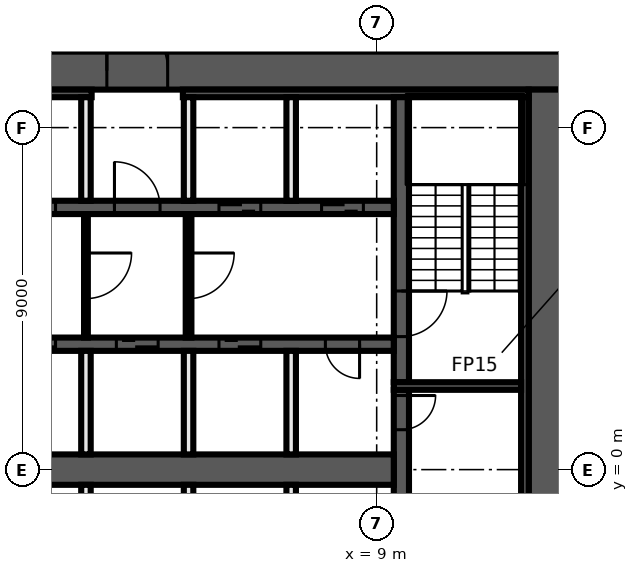
"""IFC4 building model, lengths in metres.
Left out: names, types, materials, properties, quantities, classifications, styles, units other than length and angle.
Written with IfcOpenShell. Run it as: python <this file> out.ifc"""

import sys

from ifc_helpers import new_model, si_unit, direction, frame, frame_2d, origin, place, context, subcontext, project, spatial, rectangle, extrude, element, fill, save


model = new_model("IFC4")
c1 = context("Model", 3, precision=1e-05, world=origin(), true_north=direction((0.0, 1.0)))
c2 = subcontext(c1, "Body", "Model", "MODEL_VIEW")
j1 = project(units=[si_unit("LENGTHUNIT", "METRE"), si_unit("PLANEANGLEUNIT", "RADIAN")], contexts=[c1])
p1 = place(None, origin())
s1 = spatial("IfcSite", under=j1, at=p1, CompositionType="ELEMENT")
p2 = place(p1, origin())
s2 = spatial("IfcBuilding", under=s1, at=p2, CompositionType="ELEMENT")
p3 = place(p2, frame((0.0, 0.0, 95.2)))
s3 = spatial("IfcBuildingStorey", under=s2, at=p3, CompositionType="ELEMENT", Elevation=95.2)
for number, where, z_axis, x_axis in (
    (1, (3.6, 11.0, 0.0), (0.0, 0.0, 1.0), (0.0, 1.0, 0.0)),
    (2, (1.8, 11.0, 0.0), (0.0, 0.0, 1.0), (0.0, 1.0, 0.0)),
):
    element("IfcWall", number, at=place(p3, frame(where, z_axis=z_axis, x_axis=x_axis)), inside=s3, PredefinedType="PARTITIONING", context=c2, shape_type="SweptSolid", body=[
        extrude(rectangle(XDim=1.175, YDim=0.15, at=frame_2d((0.587, 0.0))), origin(), (0.0, 0.0, 1.0), 3.25),
    ])
p4 = place(p3, frame((-14.0, 10.5, 0.0), z_axis=(0.0, 0.0, 1.0), x_axis=(1.0, 0.0, 0.0)))
e3 = element("IfcWall", 3, at=p4, inside=s3, PredefinedType="SHEAR", context=c2, shape_type="SweptSolid", body=[
    extrude(rectangle(XDim=28.0, YDim=1.0, at=frame_2d((14.0, 0.0))), origin(), (0.0, 0.0, 1.0), 3.25),
])
p5 = place(p4, frame((15.9, 0.0, 0.0)))
e4 = element("IfcOpeningElement", 4, at=p5, cuts=e3, PredefinedType="OPENING", context=c2, shape_type="SweptSolid", body=[
    extrude(rectangle(XDim=1.6, YDim=2.1, at=frame_2d((0.8, 1.05))), frame((0.0, 0.51, 0.0), z_axis=(0.0, -1.0, 0.0), x_axis=(1.0, 0.0, 0.0)), (0.0, 0.0, 1.0), 1.02),
])
p6 = place(p3, frame((13.5, 10.0, 0.0), z_axis=(0.0, 0.0, 1.0), x_axis=(0.0, -1.0, 0.0)))
e5 = element("IfcWall", 5, at=p6, inside=s3, PredefinedType="SHEAR", context=c2, shape_type="SweptSolid", body=[
    extrude(rectangle(XDim=20.0, YDim=1.0, at=frame_2d((10.0, 0.0))), origin(), (0.0, 0.0, 1.0), 3.25),
])
p7 = place(p3, frame((-13.0, 9.9, 0.0), z_axis=(0.0, 0.0, 1.0), x_axis=(1.0, 0.0, 0.0)))
e6 = element("IfcWall", 6, at=p7, inside=s3, PredefinedType="SHEAR", context=c2, shape_type="SweptSolid", body=[
    extrude(rectangle(XDim=14.5, YDim=0.2, at=frame_2d((7.25, 0.0))), origin(), (0.0, 0.0, 1.0), 3.25),
])
p8 = place(p3, frame((3.9, 9.9, 0.0), z_axis=(0.0, 0.0, 1.0), x_axis=(1.0, 0.0, 0.0)))
e7 = element("IfcWall", 7, at=p8, inside=s3, PredefinedType="SHEAR", context=c2, shape_type="SweptSolid", body=[
    extrude(rectangle(XDim=9.1, YDim=0.2, at=frame_2d((4.55, 0.0))), origin(), (0.0, 0.0, 1.0), 3.25),
])
p9 = place(p3, frame((12.9, 9.8, 0.0), z_axis=(0.0, 0.0, 1.0), x_axis=(0.0, -1.0, 0.0)))
e8 = element("IfcWall", 8, at=p9, inside=s3, PredefinedType="SHEAR", context=c2, shape_type="SweptSolid", body=[
    extrude(rectangle(XDim=19.6, YDim=0.2, at=frame_2d((9.8, 0.0))), origin(), (0.0, 0.0, 1.0), 3.25),
])
p10 = place(p3, frame((9.65, 2.1, 0.0), z_axis=(0.0, 0.0, 1.0), x_axis=(0.0, -1.0, 0.0)))
e9 = element("IfcWall", 9, at=p10, inside=s3, PredefinedType="SHEAR", context=c2, shape_type="SweptSolid", body=[
    extrude(rectangle(XDim=4.2, YDim=0.4, at=frame_2d((2.1, 0.0))), origin(), (0.0, 0.0, 1.0), 3.25),
])
p11 = place(p10, frame((0.15, 0.0, 0.0)))
e10 = element("IfcOpeningElement", 10, at=p11, cuts=e9, PredefinedType="OPENING", context=c2, shape_type="SweptSolid", body=[
    extrude(rectangle(XDim=0.9, YDim=2.1, at=frame_2d((0.45, 1.05))), frame((0.0, 0.21, 0.0), z_axis=(0.0, -1.0, 0.0), x_axis=(1.0, 0.0, 0.0)), (0.0, 0.0, 1.0), 0.42),
])
p12 = place(p3, frame((9.65, 9.8, 0.0), z_axis=(0.0, 0.0, 1.0), x_axis=(0.0, -1.0, 0.0)))
e11 = element("IfcWall", 11, at=p12, inside=s3, PredefinedType="SHEAR", context=c2, shape_type="SweptSolid", body=[
    extrude(rectangle(XDim=7.5, YDim=0.4, at=frame_2d((3.75, 0.0))), origin(), (0.0, 0.0, 1.0), 3.25),
])
p13 = place(p12, frame((5.1, 0.0, 0.0)))
e12 = element("IfcOpeningElement", 12, at=p13, cuts=e11, PredefinedType="OPENING", context=c2, shape_type="SweptSolid", body=[
    extrude(rectangle(XDim=1.2, YDim=2.1, at=frame_2d((0.6, 1.05))), frame((0.0, 0.21, 0.0), z_axis=(0.0, -1.0, 0.0), x_axis=(1.0, 0.0, 0.0)), (0.0, 0.0, 1.0), 0.42),
])
p14 = place(p3, frame((9.45, 2.2, 0.0), z_axis=(0.0, 0.0, 1.0), x_axis=(1.0, 0.0, 0.0)))
e13 = element("IfcWall", 13, at=p14, inside=s3, PredefinedType="SHEAR", context=c2, shape_type="SweptSolid", body=[
    extrude(rectangle(XDim=3.35, YDim=0.2, at=frame_2d((1.675, 0.0))), origin(), (0.0, 0.0, 1.0), 3.25),
])
p15 = place(p3, frame((-9.45, 6.9, 0.0), z_axis=(0.0, 0.0, 1.0), x_axis=(1.0, 0.0, 0.0)))
e14 = element("IfcWall", 14, at=p15, inside=s3, PredefinedType="SHEAR", context=c2, shape_type="SweptSolid", body=[
    extrude(rectangle(XDim=18.9, YDim=0.35, at=frame_2d((9.45, 0.0))), origin(), (0.0, 0.0, 1.0), 3.25),
])
p16 = place(p15, frame((0.8, 0.0, 0.0)))
e15 = element("IfcOpeningElement", 15, at=p16, cuts=e14, PredefinedType="OPENING", context=c2, shape_type="SweptSolid", body=[
    extrude(rectangle(XDim=1.1, YDim=2.1, at=frame_2d((0.55, 1.05))), frame((0.0, 0.185, 0.0), z_axis=(0.0, -1.0, 0.0), x_axis=(1.0, 0.0, 0.0)), (0.0, 0.0, 1.0), 0.37),
])
p17 = place(p15, frame((3.5, 0.0, 0.0)))
e16 = element("IfcOpeningElement", 16, at=p17, cuts=e14, PredefinedType="OPENING", context=c2, shape_type="SweptSolid", body=[
    extrude(rectangle(XDim=1.1, YDim=2.1, at=frame_2d((0.55, 1.05))), frame((0.0, 0.185, 0.0), z_axis=(0.0, -1.0, 0.0), x_axis=(1.0, 0.0, 0.0)), (0.0, 0.0, 1.0), 0.37),
])
p18 = place(p15, frame((6.2, 0.0, 0.0)))
e17 = element("IfcOpeningElement", 17, at=p18, cuts=e14, PredefinedType="OPENING", context=c2, shape_type="SweptSolid", body=[
    extrude(rectangle(XDim=1.1, YDim=2.1, at=frame_2d((0.55, 1.05))), frame((0.0, 0.185, 0.0), z_axis=(0.0, -1.0, 0.0), x_axis=(1.0, 0.0, 0.0)), (0.0, 0.0, 1.0), 0.37),
])
p19 = place(p15, frame((8.9, 0.0, 0.0)))
e18 = element("IfcOpeningElement", 18, at=p19, cuts=e14, PredefinedType="OPENING", context=c2, shape_type="SweptSolid", body=[
    extrude(rectangle(XDim=1.1, YDim=2.1, at=frame_2d((0.55, 1.05))), frame((0.0, 0.185, 0.0), z_axis=(0.0, -1.0, 0.0), x_axis=(1.0, 0.0, 0.0)), (0.0, 0.0, 1.0), 0.37),
])
p20 = place(p15, frame((11.55, 0.0, 0.0)))
e19 = element("IfcOpeningElement", 19, at=p20, cuts=e14, PredefinedType="OPENING", context=c2, shape_type="SweptSolid", body=[
    extrude(rectangle(XDim=1.2, YDim=2.1, at=frame_2d((0.6, 1.05))), frame((0.0, 0.185, 0.0), z_axis=(0.0, -1.0, 0.0), x_axis=(1.0, 0.0, 0.0)), (0.0, 0.0, 1.0), 0.37),
])
p21 = place(p15, frame((14.3, 0.0, 0.0)))
e20 = element("IfcOpeningElement", 20, at=p21, cuts=e14, PredefinedType="OPENING", context=c2, shape_type="SweptSolid", body=[
    extrude(rectangle(XDim=1.1, YDim=2.1, at=frame_2d((0.55, 1.05))), frame((0.0, 0.185, 0.0), z_axis=(0.0, -1.0, 0.0), x_axis=(1.0, 0.0, 0.0)), (0.0, 0.0, 1.0), 0.37),
])
p22 = place(p15, frame((17.0, 0.0, 0.0)))
e21 = element("IfcOpeningElement", 21, at=p22, cuts=e14, PredefinedType="OPENING", context=c2, shape_type="SweptSolid", body=[
    extrude(rectangle(XDim=1.1, YDim=2.1, at=frame_2d((0.55, 1.05))), frame((0.0, 0.185, 0.0), z_axis=(0.0, -1.0, 0.0), x_axis=(1.0, 0.0, 0.0)), (0.0, 0.0, 1.0), 0.37),
])
p23 = place(p3, frame((9.45, 3.3, 0.0), z_axis=(0.0, 0.0, 1.0), x_axis=(-1.0, 0.0, 0.0)))
e22 = element("IfcWall", 22, at=p23, inside=s3, PredefinedType="SHEAR", context=c2, shape_type="SweptSolid", body=[
    extrude(rectangle(XDim=18.9, YDim=0.35, at=frame_2d((9.45, 0.0))), origin(), (0.0, 0.0, 1.0), 3.25),
])
p24 = place(p23, frame((17.0, 0.0, 0.0)))
e23 = element("IfcOpeningElement", 23, at=p24, cuts=e22, PredefinedType="OPENING", context=c2, shape_type="SweptSolid", body=[
    extrude(rectangle(XDim=1.1, YDim=2.1, at=frame_2d((0.55, 1.05))), frame((0.0, 0.185, 0.0), z_axis=(0.0, -1.0, 0.0), x_axis=(1.0, 0.0, 0.0)), (0.0, 0.0, 1.0), 0.37),
])
p25 = place(p23, frame((14.3, 0.0, 0.0)))
e24 = element("IfcOpeningElement", 24, at=p25, cuts=e22, PredefinedType="OPENING", context=c2, shape_type="SweptSolid", body=[
    extrude(rectangle(XDim=1.1, YDim=2.1, at=frame_2d((0.55, 1.05))), frame((0.0, 0.185, 0.0), z_axis=(0.0, -1.0, 0.0), x_axis=(1.0, 0.0, 0.0)), (0.0, 0.0, 1.0), 0.37),
])
p26 = place(p23, frame((11.6, 0.0, 0.0)))
e25 = element("IfcOpeningElement", 25, at=p26, cuts=e22, PredefinedType="OPENING", context=c2, shape_type="SweptSolid", body=[
    extrude(rectangle(XDim=1.1, YDim=2.1, at=frame_2d((0.55, 1.05))), frame((0.0, 0.185, 0.0), z_axis=(0.0, -1.0, 0.0), x_axis=(1.0, 0.0, 0.0)), (0.0, 0.0, 1.0), 0.37),
])
p27 = place(p23, frame((8.9, 0.0, 0.0)))
e26 = element("IfcOpeningElement", 26, at=p27, cuts=e22, PredefinedType="OPENING", context=c2, shape_type="SweptSolid", body=[
    extrude(rectangle(XDim=1.1, YDim=2.1, at=frame_2d((0.55, 1.05))), frame((0.0, 0.185, 0.0), z_axis=(0.0, -1.0, 0.0), x_axis=(1.0, 0.0, 0.0)), (0.0, 0.0, 1.0), 0.37),
])
p28 = place(p23, frame((6.2, 0.0, 0.0)))
e27 = element("IfcOpeningElement", 27, at=p28, cuts=e22, PredefinedType="OPENING", context=c2, shape_type="SweptSolid", body=[
    extrude(rectangle(XDim=1.1, YDim=2.1, at=frame_2d((0.55, 1.05))), frame((0.0, 0.185, 0.0), z_axis=(0.0, -1.0, 0.0), x_axis=(1.0, 0.0, 0.0)), (0.0, 0.0, 1.0), 0.37),
])
p29 = place(p23, frame((3.5, 0.0, 0.0)))
e28 = element("IfcOpeningElement", 28, at=p29, cuts=e22, PredefinedType="OPENING", context=c2, shape_type="SweptSolid", body=[
    extrude(rectangle(XDim=1.1, YDim=2.1, at=frame_2d((0.55, 1.05))), frame((0.0, 0.185, 0.0), z_axis=(0.0, -1.0, 0.0), x_axis=(1.0, 0.0, 0.0)), (0.0, 0.0, 1.0), 0.37),
])
p30 = place(p23, frame((0.9, 0.0, 0.0)))
e29 = element("IfcOpeningElement", 29, at=p30, cuts=e22, PredefinedType="OPENING", context=c2, shape_type="SweptSolid", body=[
    extrude(rectangle(XDim=0.9, YDim=2.1, at=frame_2d((0.45, 1.05))), frame((0.0, 0.185, 0.0), z_axis=(0.0, -1.0, 0.0), x_axis=(1.0, 0.0, 0.0)), (0.0, 0.0, 1.0), 0.37),
])
p31 = place(p3, frame((-9.45, 0.0, 0.0), z_axis=(0.0, 0.0, 1.0), x_axis=(1.0, 0.0, 0.0)))
e30 = element("IfcWall", 30, at=p31, inside=s3, PredefinedType="SHEAR", context=c2, shape_type="SweptSolid", body=[
    extrude(rectangle(XDim=18.9, YDim=0.8, at=frame_2d((9.45, 0.0))), origin(), (0.0, 0.0, 1.0), 3.25),
])
for number, where, z_axis, x_axis in (
    (31, (6.75, -3.125, 0.0), (0.0, 0.0, 1.0), (0.0, 1.0, 0.0)),
    (32, (6.75, 0.4, 0.0), (0.0, 0.0, 1.0), (0.0, 1.0, 0.0)),
    (33, (6.75, 7.075, 0.0), (0.0, 0.0, 1.0), (0.0, 1.0, 0.0)),
):
    element("IfcWall", number, at=place(p3, frame(where, z_axis=z_axis, x_axis=x_axis)), inside=s3, PredefinedType="SOLIDWALL", context=c2, shape_type="SweptSolid", body=[
        extrude(rectangle(XDim=2.725, YDim=0.25, at=frame_2d((1.363, 0.0))), origin(), (0.0, 0.0, 1.0), 3.25),
    ])
p32 = place(p3, frame((4.05, 6.725, 0.0), z_axis=(0.0, 0.0, 1.0), x_axis=(0.0, -1.0, 0.0)))
e34 = element("IfcWall", 34, at=p32, inside=s3, PredefinedType="PARTITIONING", context=c2, shape_type="SweptSolid", body=[
    extrude(rectangle(XDim=3.25, YDim=0.15, at=frame_2d((1.625, 0.0))), origin(), (0.0, 0.0, 1.0), 3.25),
])
p33 = place(p32, frame((1.025, 0.0, 0.0)))
e35 = element("IfcOpeningElement", 35, at=p33, cuts=e34, PredefinedType="OPENING", context=c2, shape_type="SweptSolid", body=[
    extrude(rectangle(XDim=1.2, YDim=2.1, at=frame_2d((0.6, 1.05))), frame((0.0, 0.085, 0.0), z_axis=(0.0, -1.0, 0.0), x_axis=(1.0, 0.0, 0.0)), (0.0, 0.0, 1.0), 0.17),
])
for number, where, z_axis, x_axis in (
    (36, (4.05, -3.125, 0.0), (0.0, 0.0, 1.0), (0.0, 1.0, 0.0)),
    (37, (4.05, 0.4, 0.0), (0.0, 0.0, 1.0), (0.0, 1.0, 0.0)),
    (38, (4.05, 7.075, 0.0), (0.0, 0.0, 1.0), (0.0, 1.0, 0.0)),
):
    element("IfcWall", number, at=place(p3, frame(where, z_axis=z_axis, x_axis=x_axis)), inside=s3, PredefinedType="SOLIDWALL", context=c2, shape_type="SweptSolid", body=[
        extrude(rectangle(XDim=2.725, YDim=0.25, at=frame_2d((1.363, 0.0))), origin(), (0.0, 0.0, 1.0), 3.25),
    ])
p34 = place(p3, frame((1.35, 6.725, 0.0), z_axis=(0.0, 0.0, 1.0), x_axis=(0.0, -1.0, 0.0)))
e39 = element("IfcWall", 39, at=p34, inside=s3, PredefinedType="PARTITIONING", context=c2, shape_type="SweptSolid", body=[
    extrude(rectangle(XDim=3.25, YDim=0.1, at=frame_2d((1.625, 0.0))), origin(), (0.0, 0.0, 1.0), 3.25),
])
p35 = place(p34, frame((1.025, 0.0, 0.0)))
e40 = element("IfcOpeningElement", 40, at=p35, cuts=e39, PredefinedType="OPENING", context=c2, shape_type="SweptSolid", body=[
    extrude(rectangle(XDim=1.2, YDim=2.1, at=frame_2d((0.6, 1.05))), frame((0.0, 0.06, 0.0), z_axis=(0.0, -1.0, 0.0), x_axis=(1.0, 0.0, 0.0)), (0.0, 0.0, 1.0), 0.12),
])
for number, where, z_axis, x_axis in (
    (41, (1.35, -3.125, 0.0), (0.0, 0.0, 1.0), (0.0, 1.0, 0.0)),
    (42, (1.35, 0.4, 0.0), (0.0, 0.0, 1.0), (0.0, 1.0, 0.0)),
    (43, (1.35, 7.075, 0.0), (0.0, 0.0, 1.0), (0.0, 1.0, 0.0)),
):
    element("IfcWall", number, at=place(p3, frame(where, z_axis=z_axis, x_axis=x_axis)), inside=s3, PredefinedType="SOLIDWALL", context=c2, shape_type="SweptSolid", body=[
        extrude(rectangle(XDim=2.725, YDim=0.25, at=frame_2d((1.363, 0.0))), origin(), (0.0, 0.0, 1.0), 3.25),
    ])
p36 = place(p11, origin())
e44 = element("IfcDoor", 44, at=p36, inside=s3, OperationType="SINGLE_SWING_RIGHT", PredefinedType="DOOR", context=c2, shape_type="SweptSolid", body=[
    extrude(rectangle(XDim=0.9, YDim=2.1, at=frame_2d((0.45, 1.05))), frame((0.0, 0.025, 0.0), z_axis=(0.0, -1.0, 0.0), x_axis=(1.0, 0.0, 0.0)), (0.0, 0.0, 1.0), 0.05),
])
fill(e10, e44)
p37 = place(p19, origin())
e45 = element("IfcDoor", 45, at=p37, inside=s3, OperationType="DOUBLE_DOOR_SLIDING", PredefinedType="DOOR", context=c2, shape_type="SweptSolid", body=[
    extrude(rectangle(XDim=1.1, YDim=2.1, at=frame_2d((0.55, 1.05))), frame((0.0, 0.025, 0.0), z_axis=(0.0, -1.0, 0.0), x_axis=(1.0, 0.0, 0.0)), (0.0, 0.0, 1.0), 0.05),
])
fill(e18, e45)
p38 = place(p5, origin())
e46 = element("IfcDoor", 46, at=p38, inside=s3, OperationType="DOUBLE_DOOR_SINGLE_SWING", PredefinedType="DOOR", context=c2, shape_type="SweptSolid", body=[
    extrude(rectangle(XDim=1.6, YDim=2.1, at=frame_2d((0.8, 1.05))), frame((0.0, 0.025, 0.0), z_axis=(0.0, -1.0, 0.0), x_axis=(1.0, 0.0, 0.0)), (0.0, 0.0, 1.0), 0.05),
])
fill(e4, e46)
p39 = place(p20, origin())
e47 = element("IfcDoor", 47, at=p39, inside=s3, OperationType="SINGLE_SWING_LEFT", PredefinedType="DOOR", context=c2, shape_type="SweptSolid", body=[
    extrude(rectangle(XDim=1.2, YDim=2.1, at=frame_2d((0.6, 1.05))), frame((0.0, 0.025, 0.0), z_axis=(0.0, -1.0, 0.0), x_axis=(1.0, 0.0, 0.0)), (0.0, 0.0, 1.0), 0.05),
])
fill(e19, e47)
p40 = place(p21, origin())
e48 = element("IfcDoor", 48, at=p40, inside=s3, OperationType="DOUBLE_DOOR_SLIDING", PredefinedType="DOOR", context=c2, shape_type="SweptSolid", body=[
    extrude(rectangle(XDim=1.1, YDim=2.1, at=frame_2d((0.55, 1.05))), frame((0.0, 0.025, 0.0), z_axis=(0.0, -1.0, 0.0), x_axis=(1.0, 0.0, 0.0)), (0.0, 0.0, 1.0), 0.05),
])
fill(e20, e48)
p41 = place(p22, origin())
e49 = element("IfcDoor", 49, at=p41, inside=s3, OperationType="DOUBLE_DOOR_SLIDING", PredefinedType="DOOR", context=c2, shape_type="SweptSolid", body=[
    extrude(rectangle(XDim=1.1, YDim=2.1, at=frame_2d((0.55, 1.05))), frame((0.0, 0.025, 0.0), z_axis=(0.0, -1.0, 0.0), x_axis=(1.0, 0.0, 0.0)), (0.0, 0.0, 1.0), 0.05),
])
fill(e21, e49)
p42 = place(p27, origin())
e50 = element("IfcDoor", 50, at=p42, inside=s3, OperationType="DOUBLE_DOOR_SLIDING", PredefinedType="DOOR", context=c2, shape_type="SweptSolid", body=[
    extrude(rectangle(XDim=1.1, YDim=2.1, at=frame_2d((0.55, 1.05))), frame((0.0, 0.025, 0.0), z_axis=(0.0, -1.0, 0.0), x_axis=(1.0, 0.0, 0.0)), (0.0, 0.0, 1.0), 0.05),
])
fill(e26, e50)
p43 = place(p28, origin())
e51 = element("IfcDoor", 51, at=p43, inside=s3, OperationType="DOUBLE_DOOR_SLIDING", PredefinedType="DOOR", context=c2, shape_type="SweptSolid", body=[
    extrude(rectangle(XDim=1.1, YDim=2.1, at=frame_2d((0.55, 1.05))), frame((0.0, 0.025, 0.0), z_axis=(0.0, -1.0, 0.0), x_axis=(1.0, 0.0, 0.0)), (0.0, 0.0, 1.0), 0.05),
])
fill(e27, e51)
p44 = place(p29, origin())
e52 = element("IfcDoor", 52, at=p44, inside=s3, OperationType="DOUBLE_DOOR_SLIDING", PredefinedType="DOOR", context=c2, shape_type="SweptSolid", body=[
    extrude(rectangle(XDim=1.1, YDim=2.1, at=frame_2d((0.55, 1.05))), frame((0.0, 0.025, 0.0), z_axis=(0.0, -1.0, 0.0), x_axis=(1.0, 0.0, 0.0)), (0.0, 0.0, 1.0), 0.05),
])
fill(e28, e52)
p45 = place(p30, origin())
e53 = element("IfcDoor", 53, at=p45, inside=s3, OperationType="SINGLE_SWING_LEFT", PredefinedType="DOOR", context=c2, shape_type="SweptSolid", body=[
    extrude(rectangle(XDim=0.9, YDim=2.1, at=frame_2d((0.45, 1.05))), frame((0.0, 0.025, 0.0), z_axis=(0.0, -1.0, 0.0), x_axis=(1.0, 0.0, 0.0)), (0.0, 0.0, 1.0), 0.05),
])
fill(e29, e53)
p46 = place(p13, origin())
e54 = element("IfcDoor", 54, at=p46, inside=s3, OperationType="SINGLE_SWING_LEFT", PredefinedType="DOOR", context=c2, shape_type="SweptSolid", body=[
    extrude(rectangle(XDim=1.2, YDim=2.1, at=frame_2d((0.6, 1.05))), frame((0.0, 0.025, 0.0), z_axis=(0.0, -1.0, 0.0), x_axis=(1.0, 0.0, 0.0)), (0.0, 0.0, 1.0), 0.05),
])
fill(e12, e54)
p47 = place(p35, origin())
e55 = element("IfcDoor", 55, at=p47, inside=s3, OperationType="SINGLE_SWING_LEFT", PredefinedType="DOOR", context=c2, shape_type="SweptSolid", body=[
    extrude(rectangle(XDim=1.2, YDim=2.1, at=frame_2d((0.6, 1.05))), frame((0.0, 0.025, 0.0), z_axis=(0.0, -1.0, 0.0), x_axis=(1.0, 0.0, 0.0)), (0.0, 0.0, 1.0), 0.05),
])
fill(e40, e55)
p48 = place(p33, origin())
e56 = element("IfcDoor", 56, at=p48, inside=s3, OperationType="SINGLE_SWING_RIGHT", PredefinedType="DOOR", context=c2, shape_type="SweptSolid", body=[
    extrude(rectangle(XDim=1.2, YDim=2.1, at=frame_2d((0.6, 1.05))), frame((0.0, 0.025, 0.0), z_axis=(0.0, -1.0, 0.0), x_axis=(1.0, 0.0, 0.0)), (0.0, 0.0, 1.0), 0.05),
])
fill(e35, e56)
save(model, sys.argv[1])
